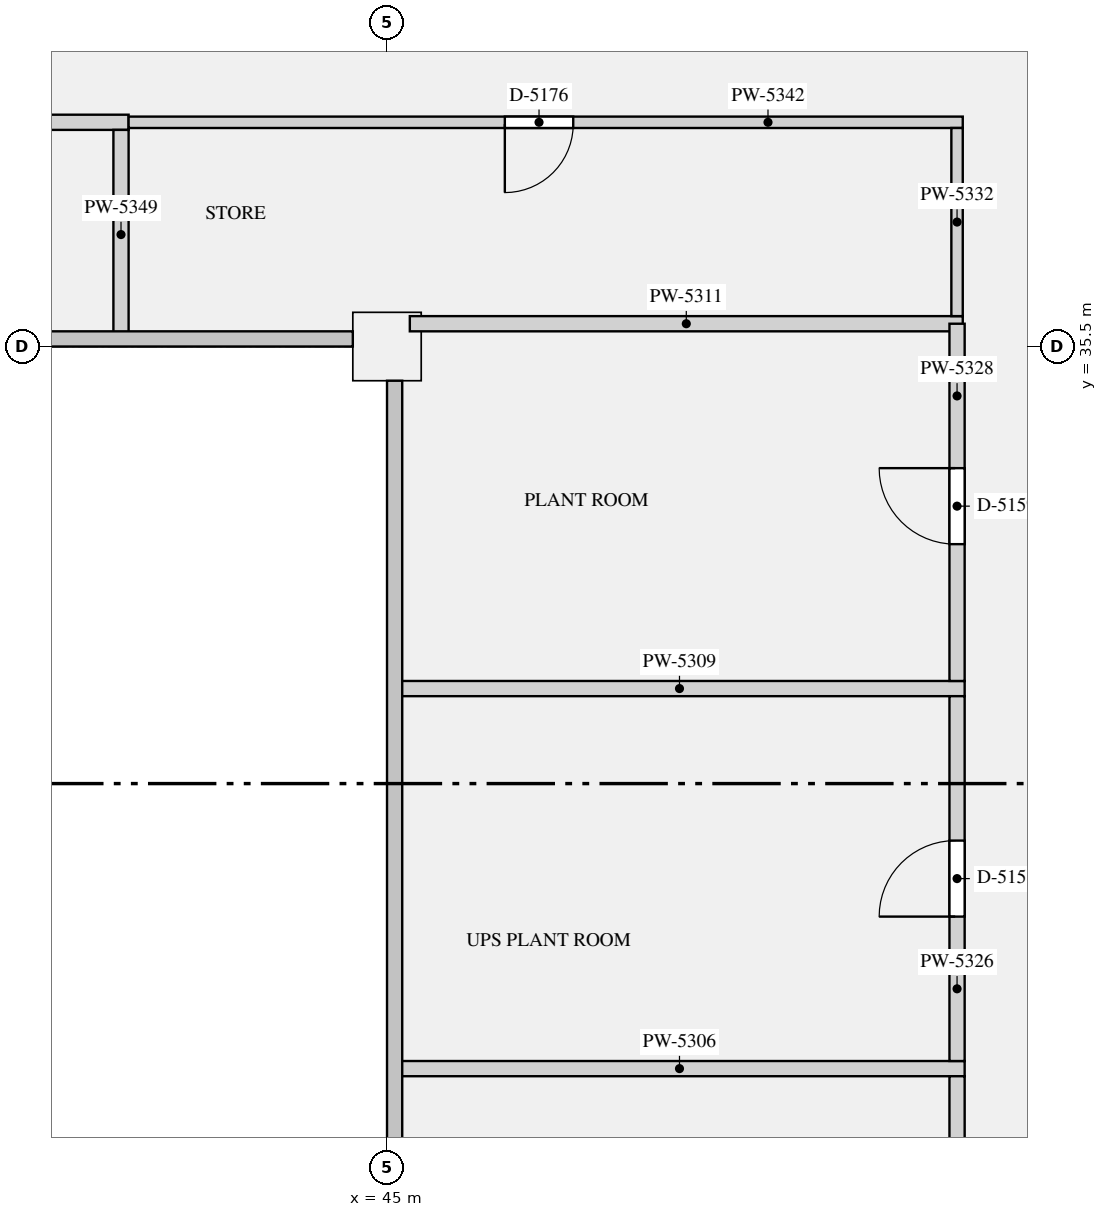
"""IFC4 building model, lengths in metres.
Left out: names, types, materials, properties, quantities, classifications, styles, units other than length and angle.
Written with IfcOpenShell. Run it as: python <this file> out.ifc"""

import sys

from ifc_helpers import new_model, si_unit, direction, frame, frame_2d, origin, origin_2d, place, context, subcontext, project, spatial, rectangle, extrude, element, fill, save


model = new_model("IFC4")
c1 = context("Model", 3, precision=1e-05, world=origin(), true_north=direction((0.0, 1.0)))
c2 = subcontext(c1, "Body", "Model", "MODEL_VIEW")
j1 = project(units=[si_unit("LENGTHUNIT", "METRE"), si_unit("PLANEANGLEUNIT", "RADIAN")], contexts=[c1])
p1 = place(None, origin())
s1 = spatial("IfcSite", under=j1, at=p1, CompositionType="ELEMENT")
p2 = place(p1, origin())
s2 = spatial("IfcBuilding", under=s1, at=p2, CompositionType="ELEMENT")
p3 = place(p2, frame((0.0, 0.0, 240.0)))
s3 = spatial("IfcBuildingStorey", under=s2, at=p3, CompositionType="ELEMENT", Elevation=240.0)
p4 = place(p3, frame((45.0, 35.5, 0.0), z_axis=(0.0, 0.0, 1.0), x_axis=(1.0, 0.0, 0.0)))
e1 = element("IfcColumn", 1, at=p4, inside=s3, PredefinedType="COLUMN", context=c2, shape_type="SweptSolid", body=[
    extrude(rectangle(XDim=0.9, YDim=0.9, at=origin_2d()), origin(), (0.0, 0.0, 1.0), 4.2),
])
for number, where, z_axis, x_axis in (
    (2, (45.096, 26.0, 0.0), (0.0, 0.0, 1.0), (1.0, 0.0, 0.0)),
    (3, (45.096, 31.0, 0.0), (0.0, 0.0, 1.0), (1.0, 0.0, 0.0)),
):
    element("IfcWall", number, at=place(p3, frame(where, z_axis=z_axis, x_axis=x_axis)), inside=s3, PredefinedType="PARTITIONING", context=c2, shape_type="SweptSolid", body=[
        extrude(rectangle(XDim=7.504, YDim=0.2, at=frame_2d((3.752, 0.0))), origin(), (0.0, 0.0, 1.0), 3.85),
    ])
p5 = place(p3, frame((45.3, 35.8, 0.0), z_axis=(0.0, 0.0, 1.0), x_axis=(1.0, 0.0, 0.0)))
e4 = element("IfcWall", 4, at=p5, inside=s3, PredefinedType="PARTITIONING", context=c2, shape_type="SweptSolid", body=[
    extrude(rectangle(XDim=7.275, YDim=0.2, at=frame_2d((3.637, 0.0))), origin(), (0.0, 0.0, 1.0), 3.85),
])
p6 = place(p3, frame((19.4, 38.45, 0.0), z_axis=(0.0, 0.0, 1.0), x_axis=(1.0, 0.0, 0.0)))
e5 = element("IfcWall", 5, at=p6, inside=s3, PredefinedType="PARTITIONING", context=c2, shape_type="SweptSolid", body=[
    extrude(rectangle(XDim=22.2, YDim=0.2, at=frame_2d((11.1, 0.0))), origin(), (0.0, 0.0, 1.0), 3.85),
])
p7 = place(p6, frame((10.6, 0.0, 0.0)))
e6 = element("IfcOpeningElement", 6, at=p7, cuts=e5, PredefinedType="OPENING", context=c2, shape_type="SweptSolid", body=[
    extrude(rectangle(XDim=1.0, YDim=2.1, at=frame_2d((0.5, 1.05))), frame((0.0, 0.11, 0.0), z_axis=(0.0, -1.0, 0.0), x_axis=(1.0, 0.0, 0.0)), (0.0, 0.0, 1.0), 0.22),
])
p8 = place(p3, frame((41.6, 38.45, 0.0), z_axis=(0.0, 0.0, 1.0), x_axis=(1.0, 0.0, 0.0)))
e7 = element("IfcWall", 7, at=p8, inside=s3, PredefinedType="PARTITIONING", context=c2, shape_type="SweptSolid", body=[
    extrude(rectangle(XDim=10.975, YDim=0.15, at=frame_2d((5.487, 0.0))), origin(), (0.0, 0.0, 1.0), 3.85),
])
p9 = place(p8, frame((4.95, 0.0, 0.0)))
e8 = element("IfcOpeningElement", 8, at=p9, cuts=e7, PredefinedType="OPENING", context=c2, shape_type="SweptSolid", body=[
    extrude(rectangle(XDim=0.9, YDim=2.1, at=frame_2d((0.45, 1.05))), frame((0.0, 0.085, 0.0), z_axis=(0.0, -1.0, 0.0), x_axis=(1.0, 0.0, 0.0)), (0.0, 0.0, 1.0), 0.17),
])
p10 = place(p3, frame((52.5, 18.6, 0.0), z_axis=(0.0, 0.0, 1.0), x_axis=(0.0, 1.0, 0.0)))
e9 = element("IfcWall", 9, at=p10, inside=s3, PredefinedType="PARTITIONING", context=c2, shape_type="SweptSolid", body=[
    extrude(rectangle(XDim=7.3, YDim=0.2, at=frame_2d((3.65, 0.0))), origin(), (0.0, 0.0, 1.0), 3.85),
])
p11 = place(p10, frame((3.15, 0.0, 0.0)))
e10 = element("IfcOpeningElement", 10, at=p11, cuts=e9, PredefinedType="OPENING", context=c2, shape_type="SweptSolid", body=[
    extrude(rectangle(XDim=1.0, YDim=2.1, at=frame_2d((0.5, 1.05))), frame((0.0, 0.11, 0.0), z_axis=(0.0, -1.0, 0.0), x_axis=(1.0, 0.0, 0.0)), (0.0, 0.0, 1.0), 0.22),
])
p12 = place(p3, frame((52.5, 26.1, 0.0), z_axis=(0.0, 0.0, 1.0), x_axis=(0.0, 1.0, 0.0)))
e11 = element("IfcWall", 11, at=p12, inside=s3, PredefinedType="PARTITIONING", context=c2, shape_type="SweptSolid", body=[
    extrude(rectangle(XDim=4.8, YDim=0.2, at=frame_2d((2.4, 0.0))), origin(), (0.0, 0.0, 1.0), 3.85),
])
p13 = place(p12, frame((1.9, 0.0, 0.0)))
e12 = element("IfcOpeningElement", 12, at=p13, cuts=e11, PredefinedType="OPENING", context=c2, shape_type="SweptSolid", body=[
    extrude(rectangle(XDim=1.0, YDim=2.1, at=frame_2d((0.5, 1.05))), frame((0.0, 0.11, 0.0), z_axis=(0.0, -1.0, 0.0), x_axis=(1.0, 0.0, 0.0)), (0.0, 0.0, 1.0), 0.22),
])
p14 = place(p3, frame((52.5, 31.1, 0.0), z_axis=(0.0, 0.0, 1.0), x_axis=(0.0, 1.0, 0.0)))
e13 = element("IfcWall", 13, at=p14, inside=s3, PredefinedType="PARTITIONING", context=c2, shape_type="SweptSolid", body=[
    extrude(rectangle(XDim=4.7, YDim=0.2, at=frame_2d((2.35, 0.0))), origin(), (0.0, 0.0, 1.0), 3.85),
])
p15 = place(p14, frame((1.8, 0.0, 0.0)))
e14 = element("IfcOpeningElement", 14, at=p15, cuts=e13, PredefinedType="OPENING", context=c2, shape_type="SweptSolid", body=[
    extrude(rectangle(XDim=1.0, YDim=2.1, at=frame_2d((0.5, 1.05))), frame((0.0, 0.11, 0.0), z_axis=(0.0, -1.0, 0.0), x_axis=(1.0, 0.0, 0.0)), (0.0, 0.0, 1.0), 0.22),
])
p16 = place(p3, frame((41.5, 35.596, 0.0), z_axis=(0.0, 0.0, 1.0), x_axis=(0.0, 1.0, 0.0)))
e15 = element("IfcWall", 15, at=p16, inside=s3, PredefinedType="PARTITIONING", context=c2, shape_type="SweptSolid", body=[
    extrude(rectangle(XDim=2.754, YDim=0.2, at=frame_2d((1.377, 0.0))), origin(), (0.0, 0.0, 1.0), 3.85),
])
p17 = place(p3, frame((52.5, 35.9, 0.0), z_axis=(0.0, 0.0, 1.0), x_axis=(0.0, 1.0, 0.0)))
e16 = element("IfcWall", 16, at=p17, inside=s3, PredefinedType="PARTITIONING", context=c2, shape_type="SweptSolid", body=[
    extrude(rectangle(XDim=2.475, YDim=0.15, at=frame_2d((1.238, 0.0))), origin(), (0.0, 0.0, 1.0), 3.85),
])
p18 = place(p13, origin())
e17 = element("IfcDoor", 17, at=p18, inside=s3, OperationType="SINGLE_SWING_LEFT", PredefinedType="DOOR", context=c2, shape_type="SweptSolid", body=[
    extrude(rectangle(XDim=1.0, YDim=2.1, at=frame_2d((0.5, 1.05))), frame((0.0, 0.025, 0.0), z_axis=(0.0, -1.0, 0.0), x_axis=(1.0, 0.0, 0.0)), (0.0, 0.0, 1.0), 0.05),
])
fill(e12, e17)
p19 = place(p15, origin())
e18 = element("IfcDoor", 18, at=p19, inside=s3, OperationType="SINGLE_SWING_RIGHT", PredefinedType="DOOR", context=c2, shape_type="SweptSolid", body=[
    extrude(rectangle(XDim=1.0, YDim=2.1, at=frame_2d((0.5, 1.05))), frame((0.0, 0.025, 0.0), z_axis=(0.0, -1.0, 0.0), x_axis=(1.0, 0.0, 0.0)), (0.0, 0.0, 1.0), 0.05),
])
fill(e14, e18)
p20 = place(p9, frame((0.9, 0.0, 0.0), z_axis=(0.0, 0.0, 1.0), x_axis=(-1.0, 0.0, 0.0)))
e19 = element("IfcDoor", 19, at=p20, inside=s3, OperationType="SINGLE_SWING_RIGHT", PredefinedType="DOOR", context=c2, shape_type="SweptSolid", body=[
    extrude(rectangle(XDim=0.9, YDim=2.1, at=frame_2d((0.45, 1.05))), frame((0.0, 0.025, 0.0), z_axis=(0.0, -1.0, 0.0), x_axis=(1.0, 0.0, 0.0)), (0.0, 0.0, 1.0), 0.05),
])
fill(e8, e19)
save(model, sys.argv[1])
